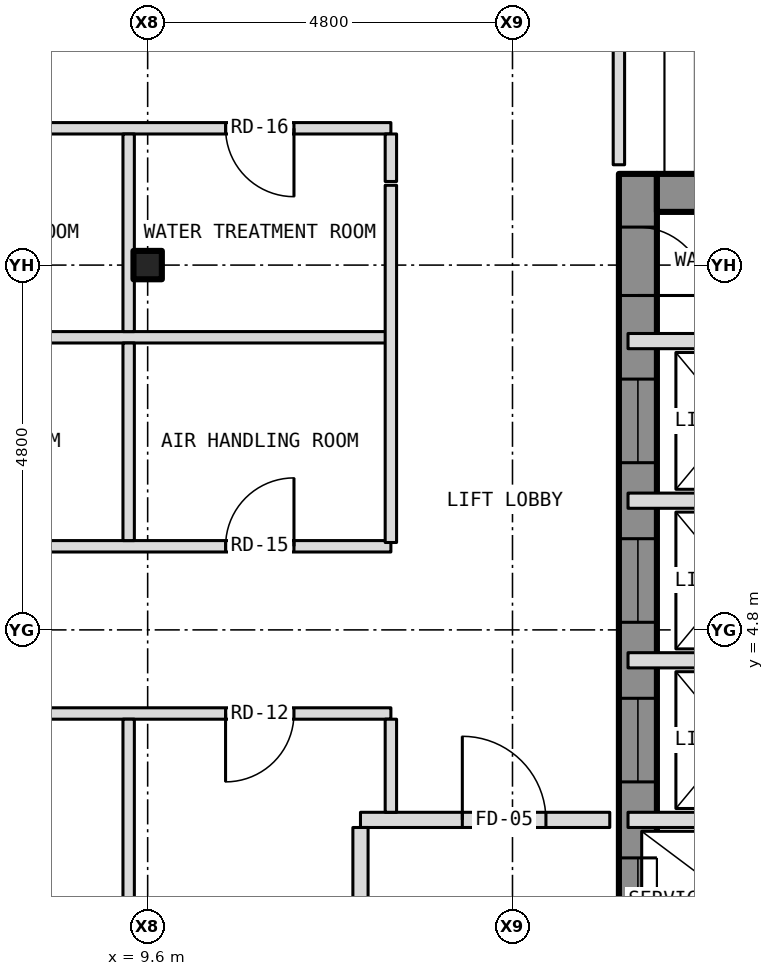
"""IFC4 building model, lengths in metres.
Left out: names, types, materials, properties, quantities, classifications, styles, units other than length and angle.
Written with IfcOpenShell. Run it as: python <this file> out.ifc"""

import sys

from ifc_helpers import new_model, si_unit, direction, frame, frame_2d, origin, origin_2d, place, context, subcontext, project, spatial, rectangle, i_section, extrude, element, fill, save


model = new_model("IFC4")
c1 = context("Model", 3, precision=1e-05, world=origin(), true_north=direction((0.0, 1.0)))
c2 = subcontext(c1, "Body", "Model", "MODEL_VIEW")
j1 = project(units=[si_unit("LENGTHUNIT", "METRE"), si_unit("PLANEANGLEUNIT", "RADIAN")], contexts=[c1])
p1 = place(None, origin())
s1 = spatial("IfcSite", under=j1, at=p1, CompositionType="ELEMENT")
p2 = place(p1, origin())
s2 = spatial("IfcBuilding", under=s1, at=p2, CompositionType="ELEMENT")
p3 = place(p2, frame((0.0, 0.0, 186.5)))
s3 = spatial("IfcBuildingStorey", under=s2, at=p3, CompositionType="ELEMENT", Elevation=186.5)
p4 = place(p3, frame((9.6, 9.6, -0.3), z_axis=(0.0, 0.0, 1.0), x_axis=(1.0, 0.0, 0.0)))
e1 = element("IfcColumn", 1, at=p4, inside=s3, PredefinedType="COLUMN", context=c2, shape_type="SweptSolid", body=[
    extrude(i_section(OverallWidth=0.373, OverallDepth=0.373, WebThickness=0.016, FlangeThickness=0.026, at=origin_2d()), origin(), (0.0, 0.0, 1.0), 4.65),
])
p5 = place(p3, frame((16.05, -10.8, 0.0), z_axis=(0.0, 0.0, 1.0), x_axis=(0.0, 1.0, 0.0)))
e2 = element("IfcWall", 2, at=p5, inside=s3, PredefinedType="SHEAR", context=c2, shape_type="SweptSolid", body=[
    extrude(rectangle(XDim=21.6, YDim=0.5, at=frame_2d((10.8, 0.0))), origin(), (0.0, 0.0, 1.0), 3.9),
])
p6 = place(p5, frame((9.4, 0.0, 0.0)))
e3 = element("IfcOpeningElement", 3, at=p6, cuts=e2, PredefinedType="OPENING", context=c2, shape_type="SweptSolid", body=[
    extrude(rectangle(XDim=1.1, YDim=2.1, at=frame_2d((0.55, 1.05))), frame((0.0, 0.262, 0.0), z_axis=(0.0, -1.0, 0.0), x_axis=(1.0, 0.0, 0.0)), (0.0, 0.0, 1.0), 0.524),
])
p7 = place(p5, frame((11.5, 0.0, 0.0)))
e4 = element("IfcOpeningElement", 4, at=p7, cuts=e2, PredefinedType="OPENING", context=c2, shape_type="SweptSolid", body=[
    extrude(rectangle(XDim=1.1, YDim=2.1, at=frame_2d((0.55, 1.05))), frame((0.0, 0.262, 0.0), z_axis=(0.0, -1.0, 0.0), x_axis=(1.0, 0.0, 0.0)), (0.0, 0.0, 1.0), 0.524),
])
p8 = place(p5, frame((13.6, 0.0, 0.0)))
e5 = element("IfcOpeningElement", 5, at=p8, cuts=e2, PredefinedType="OPENING", context=c2, shape_type="SweptSolid", body=[
    extrude(rectangle(XDim=1.1, YDim=2.1, at=frame_2d((0.55, 1.05))), frame((0.0, 0.262, 0.0), z_axis=(0.0, -1.0, 0.0), x_axis=(1.0, 0.0, 0.0)), (0.0, 0.0, 1.0), 0.524),
])
p9 = place(p5, frame((15.7, 0.0, 0.0)))
e6 = element("IfcOpeningElement", 6, at=p9, cuts=e2, PredefinedType="OPENING", context=c2, shape_type="SweptSolid", body=[
    extrude(rectangle(XDim=1.1, YDim=2.1, at=frame_2d((0.55, 1.05))), frame((0.0, 0.262, 0.0), z_axis=(0.0, -1.0, 0.0), x_axis=(1.0, 0.0, 0.0)), (0.0, 0.0, 1.0), 0.524),
])
p10 = place(p5, frame((17.8, 0.0, 0.0)))
e7 = element("IfcOpeningElement", 7, at=p10, cuts=e2, PredefinedType="OPENING", context=c2, shape_type="SweptSolid", body=[
    extrude(rectangle(XDim=1.1, YDim=2.1, at=frame_2d((0.55, 1.05))), frame((0.0, 0.262, 0.0), z_axis=(0.0, -1.0, 0.0), x_axis=(1.0, 0.0, 0.0)), (0.0, 0.0, 1.0), 0.524),
])
p11 = place(p5, frame((5.642, 0.0, 0.0)))
e8 = element("IfcOpeningElement", 8, at=p11, cuts=e2, PredefinedType="OPENING", context=c2, shape_type="SweptSolid", body=[
    extrude(rectangle(XDim=1.1, YDim=2.1, at=frame_2d((0.55, 1.05))), frame((0.0, 0.262, 0.0), z_axis=(0.0, -1.0, 0.0), x_axis=(1.0, 0.0, 0.0)), (0.0, 0.0, 1.0), 0.524),
])
p12 = place(p5, frame((7.5, 0.0, 0.0)))
e9 = element("IfcOpeningElement", 9, at=p12, cuts=e2, PredefinedType="OPENING", context=c2, shape_type="SweptSolid", body=[
    extrude(rectangle(XDim=1.1, YDim=2.1, at=frame_2d((0.55, 1.05))), frame((0.0, 0.262, 0.0), z_axis=(0.0, -1.0, 0.0), x_axis=(1.0, 0.0, 0.0)), (0.0, 0.0, 1.0), 0.524),
])
p13 = place(p5, frame((20.0, 0.0, 0.0)))
e10 = element("IfcOpeningElement", 10, at=p13, cuts=e2, PredefinedType="OPENING", context=c2, shape_type="SweptSolid", body=[
    extrude(rectangle(XDim=0.9, YDim=2.1, at=frame_2d((0.45, 1.05))), frame((0.0, 0.262, 0.0), z_axis=(0.0, -1.0, 0.0), x_axis=(1.0, 0.0, 0.0)), (0.0, 0.0, 1.0), 0.524),
])
p14 = place(p3, frame((16.3, 10.55, 0.0), z_axis=(0.0, 0.0, 1.0), x_axis=(1.0, 0.0, 0.0)))
e11 = element("IfcWall", 11, at=p14, inside=s3, PredefinedType="SHEAR", context=c2, shape_type="SweptSolid", body=[
    extrude(rectangle(XDim=4.8, YDim=0.5, at=frame_2d((2.4, 0.0))), origin(), (0.0, 0.0, 1.0), 3.9),
])
p15 = place(p3, frame((12.4, 2.3, 0.0), z_axis=(0.0, 0.0, 1.0), x_axis=(1.0, 0.0, 0.0)))
e12 = element("IfcWall", 12, at=p15, inside=s3, PredefinedType="PARTITIONING", context=c2, shape_type="SweptSolid", body=[
    extrude(rectangle(XDim=3.28, YDim=0.2, at=frame_2d((1.64, 0.0))), origin(), (0.0, 0.0, 1.0), 4.35),
])
p16 = place(p15, frame((1.34, 0.0, 0.0)))
e13 = element("IfcOpeningElement", 13, at=p16, cuts=e12, PredefinedType="OPENING", context=c2, shape_type="SweptSolid", body=[
    extrude(rectangle(XDim=1.1, YDim=2.1, at=frame_2d((0.55, 1.05))), frame((0.0, 0.112, 0.0), z_axis=(0.0, -1.0, 0.0), x_axis=(1.0, 0.0, 0.0)), (0.0, 0.0, 1.0), 0.224),
])
p17 = place(p3, frame((15.92, 2.3, 0.0), z_axis=(0.0, 0.0, 1.0), x_axis=(1.0, 0.0, 0.0)))
e14 = element("IfcWall", 14, at=p17, inside=s3, PredefinedType="PARTITIONING", context=c2, shape_type="SweptSolid", body=[
    extrude(rectangle(XDim=2.88, YDim=0.2, at=frame_2d((1.44, 0.0))), origin(), (0.0, 0.0, 1.0), 3.9),
])
p18 = place(p3, frame((5.9, 3.7, 0.0), z_axis=(0.0, 0.0, 1.0), x_axis=(1.0, 0.0, 0.0)))
e15 = element("IfcWall", 15, at=p18, inside=s3, PredefinedType="PARTITIONING", context=c2, shape_type="SweptSolid", body=[
    extrude(rectangle(XDim=6.9, YDim=0.15, at=frame_2d((3.45, 0.0))), origin(), (0.0, 0.0, 1.0), 4.35),
])
p19 = place(p18, frame((4.725, 0.0, 0.0)))
e16 = element("IfcOpeningElement", 16, at=p19, cuts=e15, PredefinedType="OPENING", context=c2, shape_type="SweptSolid", body=[
    extrude(rectangle(XDim=0.9, YDim=2.1, at=frame_2d((0.45, 1.05))), frame((0.0, 0.087, 0.0), z_axis=(0.0, -1.0, 0.0), x_axis=(1.0, 0.0, 0.0)), (0.0, 0.0, 1.0), 0.174),
])
p20 = place(p3, frame((15.92, 4.4, 0.0), z_axis=(0.0, 0.0, 1.0), x_axis=(1.0, 0.0, 0.0)))
e17 = element("IfcWall", 17, at=p20, inside=s3, PredefinedType="PARTITIONING", context=c2, shape_type="SweptSolid", body=[
    extrude(rectangle(XDim=5.56, YDim=0.2, at=frame_2d((2.78, 0.0))), origin(), (0.0, 0.0, 1.0), 3.9),
])
p21 = place(p20, frame((3.83, 0.0, 0.0)))
e18 = element("IfcOpeningElement", 18, at=p21, cuts=e17, PredefinedType="OPENING", context=c2, shape_type="SweptSolid", body=[
    extrude(rectangle(XDim=0.9, YDim=2.1, at=frame_2d((0.45, 1.05))), frame((0.0, 0.112, 0.0), z_axis=(0.0, -1.0, 0.0), x_axis=(1.0, 0.0, 0.0)), (0.0, 0.0, 1.0), 0.224),
])
p22 = place(p3, frame((5.9, 5.9, 0.0), z_axis=(0.0, 0.0, 1.0), x_axis=(1.0, 0.0, 0.0)))
e19 = element("IfcWall", 19, at=p22, inside=s3, PredefinedType="PARTITIONING", context=c2, shape_type="SweptSolid", body=[
    extrude(rectangle(XDim=6.9, YDim=0.15, at=frame_2d((3.45, 0.0))), origin(), (0.0, 0.0, 1.0), 4.35),
])
p23 = place(p22, frame((1.275, 0.0, 0.0)))
e20 = element("IfcOpeningElement", 20, at=p23, cuts=e19, PredefinedType="OPENING", context=c2, shape_type="SweptSolid", body=[
    extrude(rectangle(XDim=0.9, YDim=2.1, at=frame_2d((0.45, 1.05))), frame((0.0, 0.087, 0.0), z_axis=(0.0, -1.0, 0.0), x_axis=(1.0, 0.0, 0.0)), (0.0, 0.0, 1.0), 0.174),
])
p24 = place(p22, frame((4.725, 0.0, 0.0)))
e21 = element("IfcOpeningElement", 21, at=p24, cuts=e19, PredefinedType="OPENING", context=c2, shape_type="SweptSolid", body=[
    extrude(rectangle(XDim=0.9, YDim=2.1, at=frame_2d((0.45, 1.05))), frame((0.0, 0.087, 0.0), z_axis=(0.0, -1.0, 0.0), x_axis=(1.0, 0.0, 0.0)), (0.0, 0.0, 1.0), 0.174),
])
for number, where, z_axis, x_axis in (
    (22, (15.92, 6.5, 0.0), (0.0, 0.0, 1.0), (1.0, 0.0, 0.0)),
    (23, (15.92, 8.6, 0.0), (0.0, 0.0, 1.0), (1.0, 0.0, 0.0)),
):
    element("IfcWall", number, at=place(p3, frame(where, z_axis=z_axis, x_axis=x_axis)), inside=s3, PredefinedType="PARTITIONING", context=c2, shape_type="SweptSolid", body=[
        extrude(rectangle(XDim=2.88, YDim=0.2, at=frame_2d((1.44, 0.0))), origin(), (0.0, 0.0, 1.0), 3.9),
    ])
p25 = place(p3, frame((5.9, 8.65, 0.0), z_axis=(0.0, 0.0, 1.0), x_axis=(1.0, 0.0, 0.0)))
e24 = element("IfcWall", 24, at=p25, inside=s3, PredefinedType="PARTITIONING", context=c2, shape_type="SweptSolid", body=[
    extrude(rectangle(XDim=6.9, YDim=0.15, at=frame_2d((3.45, 0.0))), origin(), (0.0, 0.0, 1.0), 4.35),
])
p26 = place(p3, frame((5.9, 11.4, 0.0), z_axis=(0.0, 0.0, 1.0), x_axis=(1.0, 0.0, 0.0)))
e25 = element("IfcWall", 25, at=p26, inside=s3, PredefinedType="PARTITIONING", context=c2, shape_type="SweptSolid", body=[
    extrude(rectangle(XDim=6.9, YDim=0.15, at=frame_2d((3.45, 0.0))), origin(), (0.0, 0.0, 1.0), 4.35),
])
p27 = place(p26, frame((1.275, 0.0, 0.0)))
e26 = element("IfcOpeningElement", 26, at=p27, cuts=e25, PredefinedType="OPENING", context=c2, shape_type="SweptSolid", body=[
    extrude(rectangle(XDim=0.9, YDim=2.1, at=frame_2d((0.45, 1.05))), frame((0.0, 0.087, 0.0), z_axis=(0.0, -1.0, 0.0), x_axis=(1.0, 0.0, 0.0)), (0.0, 0.0, 1.0), 0.174),
])
p28 = place(p26, frame((4.725, 0.0, 0.0)))
e27 = element("IfcOpeningElement", 27, at=p28, cuts=e25, PredefinedType="OPENING", context=c2, shape_type="SweptSolid", body=[
    extrude(rectangle(XDim=0.9, YDim=2.1, at=frame_2d((0.45, 1.05))), frame((0.0, 0.087, 0.0), z_axis=(0.0, -1.0, 0.0), x_axis=(1.0, 0.0, 0.0)), (0.0, 0.0, 1.0), 0.174),
])
p29 = place(p3, frame((9.35, -3.775, 0.0), z_axis=(0.0, 0.0, 1.0), x_axis=(0.0, 1.0, 0.0)))
e28 = element("IfcWall", 28, at=p29, inside=s3, PredefinedType="PARTITIONING", context=c2, shape_type="SweptSolid", body=[
    extrude(rectangle(XDim=7.4, YDim=0.15, at=frame_2d((3.7, 0.0))), origin(), (0.0, 0.0, 1.0), 4.35),
])
for number, where, z_axis, x_axis in (
    (29, (9.35, 5.975, 0.0), (0.0, 0.0, 1.0), (0.0, 1.0, 0.0)),
    (30, (9.35, 8.725, 0.0), (0.0, 0.0, 1.0), (0.0, 1.0, 0.0)),
):
    element("IfcWall", number, at=place(p3, frame(where, z_axis=z_axis, x_axis=x_axis)), inside=s3, PredefinedType="PARTITIONING", context=c2, shape_type="SweptSolid", body=[
        extrude(rectangle(XDim=2.6, YDim=0.15, at=frame_2d((1.3, 0.0))), origin(), (0.0, 0.0, 1.0), 4.35),
    ])
p30 = place(p3, frame((12.4, -1.8, 0.0), z_axis=(0.0, 0.0, 1.0), x_axis=(0.0, 1.0, 0.0)))
e31 = element("IfcWall", 31, at=p30, inside=s3, PredefinedType="PARTITIONING", context=c2, shape_type="SweptSolid", body=[
    extrude(rectangle(XDim=4.0, YDim=0.2, at=frame_2d((2.0, 0.0))), origin(), (0.0, 0.0, 1.0), 4.35),
])
p31 = place(p3, frame((12.8, 2.4, 0.0), z_axis=(0.0, 0.0, 1.0), x_axis=(0.0, 1.0, 0.0)))
e32 = element("IfcWall", 32, at=p31, inside=s3, PredefinedType="PARTITIONING", context=c2, shape_type="SweptSolid", body=[
    extrude(rectangle(XDim=1.225, YDim=0.15, at=frame_2d((0.613, 0.0))), origin(), (0.0, 0.0, 1.0), 4.35),
])
p32 = place(p3, frame((12.8, 5.95, 0.0), z_axis=(0.0, 0.0, 1.0), x_axis=(0.0, 1.0, 0.0)))
e33 = element("IfcWall", 33, at=p32, inside=s3, PredefinedType="PARTITIONING", context=c2, shape_type="SweptSolid", body=[
    extrude(rectangle(XDim=4.7, YDim=0.15, at=frame_2d((2.35, 0.0))), origin(), (0.0, 0.0, 1.0), 4.35),
])
p33 = place(p3, frame((12.8, 10.7, 0.0), z_axis=(0.0, 0.0, 1.0), x_axis=(0.0, 1.0, 0.0)))
e34 = element("IfcWall", 34, at=p33, inside=s3, PredefinedType="PARTITIONING", context=c2, shape_type="SweptSolid", body=[
    extrude(rectangle(XDim=0.625, YDim=0.15, at=frame_2d((0.312, 0.0))), origin(), (0.0, 0.0, 1.0), 4.35),
])
p34 = place(p3, frame((15.8, 10.92, 0.0), z_axis=(0.0, 0.0, 1.0), x_axis=(0.0, 1.0, 0.0)))
e35 = element("IfcWall", 35, at=p34, inside=s3, PredefinedType="PARTITIONING", context=c2, shape_type="SweptSolid", body=[
    extrude(rectangle(XDim=2.605, YDim=0.15, at=frame_2d((1.302, 0.0))), origin(), (0.0, 0.0, 1.0), 4.35),
])
p35 = place(p7, origin())
e36 = element("IfcDoor", 36, at=p35, inside=s3, OperationType="SLIDING_TO_LEFT", PredefinedType="DOOR", context=c2, shape_type="SweptSolid", body=[
    extrude(rectangle(XDim=1.1, YDim=2.1, at=frame_2d((0.55, 1.05))), frame((0.0, 0.025, 0.0), z_axis=(0.0, -1.0, 0.0), x_axis=(1.0, 0.0, 0.0)), (0.0, 0.0, 1.0), 0.05),
])
fill(e4, e36)
p36 = place(p8, origin())
e37 = element("IfcDoor", 37, at=p36, inside=s3, OperationType="SLIDING_TO_LEFT", PredefinedType="DOOR", context=c2, shape_type="SweptSolid", body=[
    extrude(rectangle(XDim=1.1, YDim=2.1, at=frame_2d((0.55, 1.05))), frame((0.0, 0.025, 0.0), z_axis=(0.0, -1.0, 0.0), x_axis=(1.0, 0.0, 0.0)), (0.0, 0.0, 1.0), 0.05),
])
fill(e5, e37)
p37 = place(p9, origin())
e38 = element("IfcDoor", 38, at=p37, inside=s3, OperationType="SLIDING_TO_LEFT", PredefinedType="DOOR", context=c2, shape_type="SweptSolid", body=[
    extrude(rectangle(XDim=1.1, YDim=2.1, at=frame_2d((0.55, 1.05))), frame((0.0, 0.025, 0.0), z_axis=(0.0, -1.0, 0.0), x_axis=(1.0, 0.0, 0.0)), (0.0, 0.0, 1.0), 0.05),
])
fill(e6, e38)
p38 = place(p10, origin())
e39 = element("IfcDoor", 39, at=p38, inside=s3, OperationType="SLIDING_TO_LEFT", PredefinedType="DOOR", context=c2, shape_type="SweptSolid", body=[
    extrude(rectangle(XDim=1.1, YDim=2.1, at=frame_2d((0.55, 1.05))), frame((0.0, 0.025, 0.0), z_axis=(0.0, -1.0, 0.0), x_axis=(1.0, 0.0, 0.0)), (0.0, 0.0, 1.0), 0.05),
])
fill(e7, e39)
p39 = place(p13, origin())
e40 = element("IfcDoor", 40, at=p39, inside=s3, OperationType="SINGLE_SWING_LEFT", PredefinedType="DOOR", context=c2, shape_type="SweptSolid", body=[
    extrude(rectangle(XDim=0.9, YDim=2.1, at=frame_2d((0.45, 1.05))), frame((0.0, 0.025, 0.0), z_axis=(0.0, -1.0, 0.0), x_axis=(1.0, 0.0, 0.0)), (0.0, 0.0, 1.0), 0.05),
])
fill(e10, e40)
p40 = place(p16, origin())
e41 = element("IfcDoor", 41, at=p40, inside=s3, OperationType="SINGLE_SWING_LEFT", PredefinedType="DOOR", context=c2, shape_type="SweptSolid", body=[
    extrude(rectangle(XDim=1.1, YDim=2.1, at=frame_2d((0.55, 1.05))), frame((0.0, 0.025, 0.0), z_axis=(0.0, -1.0, 0.0), x_axis=(1.0, 0.0, 0.0)), (0.0, 0.0, 1.0), 0.05),
])
fill(e13, e41)
p41 = place(p19, origin())
e42 = element("IfcDoor", 42, at=p41, inside=s3, OperationType="SINGLE_SWING_LEFT", PredefinedType="DOOR", context=c2, shape_type="SweptSolid", body=[
    extrude(rectangle(XDim=0.9, YDim=2.1, at=frame_2d((0.45, 1.05))), frame((0.0, 0.025, 0.0), z_axis=(0.0, -1.0, 0.0), x_axis=(1.0, 0.0, 0.0)), (0.0, 0.0, 1.0), 0.05),
])
fill(e16, e42)
p42 = place(p24, origin())
e43 = element("IfcDoor", 43, at=p42, inside=s3, OperationType="SINGLE_SWING_RIGHT", PredefinedType="DOOR", context=c2, shape_type="SweptSolid", body=[
    extrude(rectangle(XDim=0.9, YDim=2.1, at=frame_2d((0.45, 1.05))), frame((0.0, 0.025, 0.0), z_axis=(0.0, -1.0, 0.0), x_axis=(1.0, 0.0, 0.0)), (0.0, 0.0, 1.0), 0.05),
])
fill(e21, e43)
p43 = place(p28, origin())
e44 = element("IfcDoor", 44, at=p43, inside=s3, OperationType="SINGLE_SWING_RIGHT", PredefinedType="DOOR", context=c2, shape_type="SweptSolid", body=[
    extrude(rectangle(XDim=0.9, YDim=2.1, at=frame_2d((0.45, 1.05))), frame((0.0, 0.025, 0.0), z_axis=(0.0, -1.0, 0.0), x_axis=(1.0, 0.0, 0.0)), (0.0, 0.0, 1.0), 0.05),
])
fill(e27, e44)
save(model, sys.argv[1])
